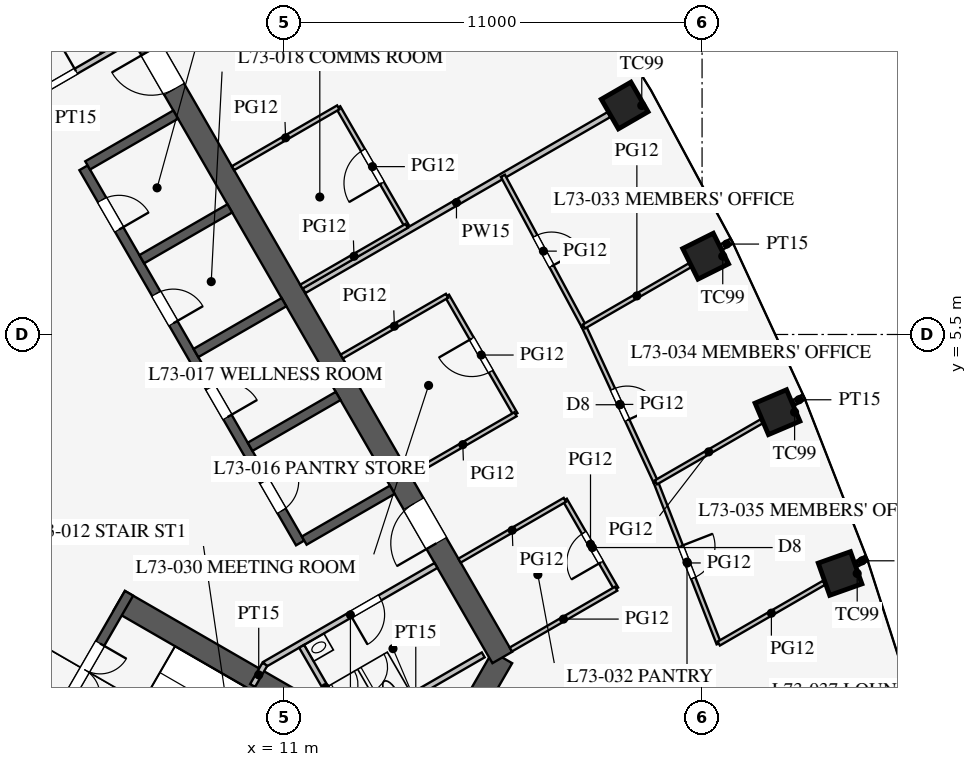
"""IFC4 building model, lengths in metres.
Left out: names, types, materials, properties, quantities, classifications, styles, units other than length and angle.
Written with IfcOpenShell. Run it as: python <this file> out.ifc"""

import sys

from ifc_helpers import new_model, si_unit, direction, frame, frame_2d, origin, origin_2d, place, context, subcontext, project, spatial, rectangle, extrude, element, fill, save


model = new_model("IFC4")
c1 = context("Model", 3, precision=1e-05, world=origin(), true_north=direction((0.0, 1.0)))
c2 = subcontext(c1, "Body", "Model", "MODEL_VIEW")
j1 = project(units=[si_unit("LENGTHUNIT", "METRE"), si_unit("PLANEANGLEUNIT", "RADIAN")], contexts=[c1])
p1 = place(None, origin())
s1 = spatial("IfcSite", under=j1, at=p1, CompositionType="ELEMENT")
p2 = place(p1, origin())
s2 = spatial("IfcBuilding", under=s1, at=p2, CompositionType="ELEMENT")
p3 = place(p2, frame((0.0, 0.0, 318.3)))
s3 = spatial("IfcBuildingStorey", under=s2, at=p3, CompositionType="ELEMENT", Elevation=318.3)
for number, where, z_axis, x_axis in (
    (1, (25.632, -0.79, 0.0), (0.0, 0.0, 1.0), (-0.334, 0.942, 0.0)),
    (2, (23.985, 3.455, 0.0), (0.0, 0.0, 1.0), (-0.391, 0.92, 0.0)),
    (3, (22.094, 7.56, 0.0), (0.0, 0.0, 1.0), (-0.447, 0.895, 0.0)),
    (4, (19.963, 11.526, 0.0), (0.0, 0.0, 1.0), (-0.5, 0.866, 0.0)),
):
    element("IfcColumn", number, at=place(p3, frame(where, z_axis=z_axis, x_axis=x_axis)), inside=s3, PredefinedType="COLUMN", context=c2, shape_type="SweptSolid", body=[
        extrude(rectangle(XDim=0.9, YDim=0.9, at=origin_2d()), origin(), (0.0, 0.0, 1.0), 4.2),
    ])
p4 = place(p3, frame((10.97, -13.0, 0.0), z_axis=(0.0, 0.0, 1.0), x_axis=(0.499995765644, 0.866027848477, 0.0)))
e5 = element("IfcWall", 5, at=p4, inside=s3, PredefinedType="SHEAR", context=c2, shape_type="SweptSolid", body=[
    extrude(rectangle(XDim=11.547, YDim=0.6, at=frame_2d((5.773, 0.0))), origin(), (0.0, 0.0, 1.0), 4.2),
])
p5 = place(p3, frame((16.743, -3.0, 0.0), z_axis=(0.0, 0.0, 1.0), x_axis=(-0.500002442456, 0.866023993627, 0.0)))
e6 = element("IfcWall", 6, at=p5, inside=s3, PredefinedType="SHEAR", context=c2, shape_type="SweptSolid", body=[
    extrude(rectangle(XDim=21.939, YDim=0.6, at=frame_2d((10.97, 0.0))), origin(), (0.0, 0.0, 1.0), 4.2),
])
p6 = place(p5, frame((17.27, 0.0, 0.0)))
e7 = element("IfcOpeningElement", 7, at=p6, cuts=e6, PredefinedType="OPENING", context=c2, shape_type="SweptSolid", body=[
    extrude(rectangle(XDim=1.2, YDim=2.1, at=frame_2d((0.6, 1.05))), frame((0.0, 0.31, 0.0), z_axis=(0.0, -1.0, 0.0), x_axis=(1.0, 0.0, 0.0)), (0.0, 0.0, 1.0), 0.62),
])
p7 = place(p5, frame((3.47, 0.0, 0.0)))
e8 = element("IfcOpeningElement", 8, at=p7, cuts=e6, PredefinedType="OPENING", context=c2, shape_type="SweptSolid", body=[
    extrude(rectangle(XDim=1.2, YDim=2.1, at=frame_2d((0.6, 1.05))), frame((0.0, 0.31, 0.0), z_axis=(0.0, -1.0, 0.0), x_axis=(1.0, 0.0, 0.0)), (0.0, 0.0, 1.0), 0.62),
])
p8 = place(p3, frame((11.424, 0.014, 0.0), z_axis=(0.0, 0.0, 1.0), x_axis=(-0.500001763848, 0.866024385424, 0.0)))
e9 = element("IfcWall", 9, at=p8, inside=s3, PredefinedType="SHEAR", context=c2, shape_type="SweptSolid", body=[
    extrude(rectangle(XDim=11.4, YDim=0.25, at=frame_2d((5.7, 0.0))), origin(), (0.0, 0.0, 1.0), 4.2),
])
p9 = place(p8, frame((0.975, 0.0, 0.0)))
e10 = element("IfcOpeningElement", 10, at=p9, cuts=e9, PredefinedType="OPENING", context=c2, shape_type="SweptSolid", body=[
    extrude(rectangle(XDim=0.9, YDim=2.1, at=frame_2d((0.45, 1.05))), frame((0.0, 0.135, 0.0), z_axis=(0.0, -1.0, 0.0), x_axis=(1.0, 0.0, 0.0)), (0.0, 0.0, 1.0), 0.27),
])
p10 = place(p8, frame((3.825, 0.0, 0.0)))
e11 = element("IfcOpeningElement", 11, at=p10, cuts=e9, PredefinedType="OPENING", context=c2, shape_type="SweptSolid", body=[
    extrude(rectangle(XDim=0.9, YDim=2.1, at=frame_2d((0.45, 1.05))), frame((0.0, 0.135, 0.0), z_axis=(0.0, -1.0, 0.0), x_axis=(1.0, 0.0, 0.0)), (0.0, 0.0, 1.0), 0.27),
])
p11 = place(p8, frame((6.675, 0.0, 0.0)))
e12 = element("IfcOpeningElement", 12, at=p11, cuts=e9, PredefinedType="OPENING", context=c2, shape_type="SweptSolid", body=[
    extrude(rectangle(XDim=0.9, YDim=2.1, at=frame_2d((0.45, 1.05))), frame((0.0, 0.135, 0.0), z_axis=(0.0, -1.0, 0.0), x_axis=(1.0, 0.0, 0.0)), (0.0, 0.0, 1.0), 0.27),
])
p12 = place(p8, frame((9.525, 0.0, 0.0)))
e13 = element("IfcOpeningElement", 13, at=p12, cuts=e9, PredefinedType="OPENING", context=c2, shape_type="SweptSolid", body=[
    extrude(rectangle(XDim=0.9, YDim=2.1, at=frame_2d((0.45, 1.05))), frame((0.0, 0.135, 0.0), z_axis=(0.0, -1.0, 0.0), x_axis=(1.0, 0.0, 0.0)), (0.0, 0.0, 1.0), 0.27),
])
for number, where, z_axis, x_axis in (
    (14, (11.532, 0.076, 0.0), (0.0, 0.0, 1.0), (0.866, 0.5, 0.0)),
    (15, (10.107, 2.544, 0.0), (0.0, 0.0, 1.0), (0.866, 0.5, 0.0)),
    (16, (8.682, 5.012, 0.0), (0.0, 0.0, 1.0), (0.866, 0.5, 0.0)),
    (17, (7.257, 7.481, 0.0), (0.0, 0.0, 1.0), (0.866, 0.5, 0.0)),
    (18, (5.832, 9.949, 0.0), (0.0, 0.0, 1.0), (0.866, 0.5, 0.0)),
):
    element("IfcWall", number, at=place(p3, frame(where, z_axis=z_axis, x_axis=x_axis)), inside=s3, PredefinedType="SHEAR", context=c2, shape_type="SweptSolid", body=[
        extrude(rectangle(XDim=2.675, YDim=0.25, at=frame_2d((1.337, 0.0))), origin(), (0.0, 0.0, 1.0), 4.2),
    ])
p13 = place(p3, frame((6.663, -1.509, 0.0), z_axis=(0.0, 0.0, 1.0), x_axis=(0.86603049496, -0.499991181721, 0.0)))
e19 = element("IfcWall", 19, at=p13, inside=s3, PredefinedType="SHEAR", context=c2, shape_type="SweptSolid", body=[
    extrude(rectangle(XDim=9.175, YDim=0.6, at=frame_2d((4.587, 0.0))), origin(), (0.0, 0.0, 1.0), 4.2),
])
p14 = place(p3, frame((4.597, -5.339, 0.0), z_axis=(0.0, 0.0, 1.0), x_axis=(0.499984536904, 0.866034331223, 0.0)))
e20 = element("IfcWall", 20, at=p14, inside=s3, PredefinedType="SHEAR", context=c2, shape_type="SweptSolid", body=[
    extrude(rectangle(XDim=4.65, YDim=0.25, at=frame_2d((2.325, 0.0))), origin(), (0.0, 0.0, 1.0), 4.2),
])
p15 = place(p14, frame((1.525, 0.0, 0.0)))
e21 = element("IfcOpeningElement", 21, at=p15, cuts=e20, PredefinedType="OPENING", context=c2, shape_type="SweptSolid", body=[
    extrude(rectangle(XDim=1.6, YDim=2.1, at=frame_2d((0.8, 1.05))), frame((0.0, 0.135, 0.0), z_axis=(0.0, -1.0, 0.0), x_axis=(1.0, 0.0, 0.0)), (0.0, 0.0, 1.0), 0.27),
])
p16 = place(p3, frame((2.495, 10.678, 0.0), z_axis=(0.0, 0.0, 1.0), x_axis=(0.866021400173, 0.500006934395, 0.0)))
e22 = element("IfcWall", 22, at=p16, inside=s3, PredefinedType="PARTITIONING", context=c2, shape_type="SweptSolid", body=[
    extrude(rectangle(XDim=5.2, YDim=0.15, at=frame_2d((2.6, 0.0))), origin(), (0.0, 0.0, 1.0), 4.0),
])
p17 = place(p16, frame((2.6, 0.0, 0.0)))
e23 = element("IfcOpeningElement", 23, at=p17, cuts=e22, PredefinedType="OPENING", context=c2, shape_type="SweptSolid", body=[
    extrude(rectangle(XDim=0.9, YDim=2.1, at=frame_2d((0.45, 1.05))), frame((0.0, 0.085, 0.0), z_axis=(0.0, -1.0, 0.0), x_axis=(1.0, 0.0, 0.0)), (0.0, 0.0, 1.0), 0.17),
])
p18 = place(p3, frame((10.495, -3.178, 0.0), z_axis=(0.0, 0.0, 1.0), x_axis=(0.866021400173, 0.500006934395, 0.0)))
e24 = element("IfcWall", 24, at=p18, inside=s3, PredefinedType="PARTITIONING", context=c2, shape_type="SweptSolid", body=[
    extrude(rectangle(XDim=5.2, YDim=0.15, at=frame_2d((2.6, 0.0))), origin(), (0.0, 0.0, 1.0), 4.0),
])
p19 = place(p18, frame((2.6, 0.0, 0.0)))
e25 = element("IfcOpeningElement", 25, at=p19, cuts=e24, PredefinedType="OPENING", context=c2, shape_type="SweptSolid", body=[
    extrude(rectangle(XDim=0.9, YDim=2.1, at=frame_2d((0.45, 1.05))), frame((0.0, 0.085, 0.0), z_axis=(0.0, -1.0, 0.0), x_axis=(1.0, 0.0, 0.0)), (0.0, 0.0, 1.0), 0.17),
])
p20 = place(p3, frame((10.495, -3.178, 0.0), z_axis=(0.0, 0.0, 1.0), x_axis=(-0.499842556608, -0.866116284689, 0.0)))
e26 = element("IfcWall", 26, at=p20, inside=s3, PredefinedType="PARTITIONING", context=c2, shape_type="SweptSolid", body=[
    extrude(rectangle(XDim=0.645, YDim=0.15, at=frame_2d((0.323, 0.0))), origin(), (0.0, 0.0, 1.0), 4.0),
])
p21 = place(p3, frame((12.691, -4.982, 0.0), z_axis=(0.0, 0.0, 1.0), x_axis=(0.8660249478, 0.500000789788, 0.0)))
e27 = element("IfcWall", 27, at=p21, inside=s3, PredefinedType="PARTITIONING", context=c2, shape_type="SweptSolid", body=[
    extrude(rectangle(XDim=4.1, YDim=0.15, at=frame_2d((2.05, 0.0))), origin(), (0.0, 0.0, 1.0), 4.0),
])
p22 = place(p3, frame((11.464, -2.706, 0.0), z_axis=(0.0, 0.0, 1.0), x_axis=(0.50001992892, -0.866013897511, 0.0)))
e28 = element("IfcWall", 28, at=p22, inside=s3, PredefinedType="PARTITIONING", context=c2, shape_type="SweptSolid", body=[
    extrude(rectangle(XDim=2.51, YDim=0.15, at=frame_2d((1.255, 0.0))), origin(), (0.0, 0.0, 1.0), 4.0),
])
p23 = place(p3, frame((11.527, 6.655, 0.0), z_axis=(0.0, 0.0, 1.0), x_axis=(0.866021846952, 0.500006160563, 0.0)))
e29 = element("IfcWall", 29, at=p23, inside=s3, PredefinedType="PARTITIONING", context=c2, shape_type="SweptSolid", body=[
    extrude(rectangle(XDim=9.262, YDim=0.15, at=frame_2d((4.631, 0.0))), origin(), (0.0, 0.0, 1.0), 3.3),
])
p24 = place(p3, frame((14.227, 8.358, 0.0), z_axis=(0.0, 0.0, 1.0), x_axis=(-0.499961193289, 0.866047807691, 0.0)))
e30 = element("IfcWall", 30, at=p24, inside=s3, PredefinedType="PARTITIONING", context=c2, shape_type="SweptSolid", body=[
    extrude(rectangle(XDim=3.6, YDim=0.12, at=frame_2d((1.8, 0.0))), origin(), (0.0, 0.0, 1.0), 2.9),
])
p25 = place(p24, frame((1.3, 0.0, 0.15)))
e31 = element("IfcOpeningElement", 31, at=p25, cuts=e30, PredefinedType="OPENING", context=c2, shape_type="SweptSolid", body=[
    extrude(rectangle(XDim=1.0, YDim=2.1, at=frame_2d((0.5, 1.05))), frame((0.0, 0.07, 0.0), z_axis=(0.0, -1.0, 0.0), x_axis=(1.0, 0.0, 0.0)), (0.0, 0.0, 1.0), 0.14),
])
p26 = place(p3, frame((19.74, -1.19, 0.0), z_axis=(0.0, 0.0, 1.0), x_axis=(-0.50000943426, 0.866019956843, 0.0)))
e32 = element("IfcWall", 32, at=p26, inside=s3, PredefinedType="PARTITIONING", context=c2, shape_type="SweptSolid", body=[
    extrude(rectangle(XDim=2.7, YDim=0.12, at=frame_2d((1.35, 0.0))), origin(), (0.0, 0.0, 1.0), 2.9),
])
p27 = place(p26, frame((0.8, 0.0, 0.15)))
e33 = element("IfcOpeningElement", 33, at=p27, cuts=e32, PredefinedType="OPENING", context=c2, shape_type="SweptSolid", body=[
    extrude(rectangle(XDim=0.9, YDim=2.1, at=frame_2d((0.45, 1.05))), frame((0.0, 0.07, 0.0), z_axis=(0.0, -1.0, 0.0), x_axis=(1.0, 0.0, 0.0)), (0.0, 0.0, 1.0), 0.14),
])
p28 = place(p3, frame((17.089, 3.4, 0.0), z_axis=(0.0, 0.0, 1.0), x_axis=(-0.499982693035, 0.866035395735, 0.0)))
e34 = element("IfcWall", 34, at=p28, inside=s3, PredefinedType="PARTITIONING", context=c2, shape_type="SweptSolid", body=[
    extrude(rectangle(XDim=3.6, YDim=0.12, at=frame_2d((1.8, 0.0))), origin(), (0.0, 0.0, 1.0), 2.9),
])
p29 = place(p28, frame((1.3, 0.0, 0.15)))
e35 = element("IfcOpeningElement", 35, at=p29, cuts=e34, PredefinedType="OPENING", context=c2, shape_type="SweptSolid", body=[
    extrude(rectangle(XDim=1.0, YDim=2.1, at=frame_2d((0.5, 1.05))), frame((0.0, 0.07, 0.0), z_axis=(0.0, -1.0, 0.0), x_axis=(1.0, 0.0, 0.0)), (0.0, 0.0, 1.0), 0.14),
])
p30 = place(p3, frame((11.456, 6.758, 0.0), z_axis=(0.0, 0.0, 1.0), x_axis=(0.866042017984, 0.499971222258, 0.0)))
e36 = element("IfcWall", 36, at=p30, inside=s3, PredefinedType="PARTITIONING", context=c2, shape_type="SweptSolid", body=[
    extrude(rectangle(XDim=3.2, YDim=0.12, at=frame_2d((1.6, 0.0))), origin(), (0.0, 0.0, 1.0), 2.9),
])
for number, where, z_axis, x_axis in (
    (37, (9.656, 9.876, 0.0), (0.0, 0.0, 1.0), (0.866, 0.5, 0.0)),
    (38, (16.968, -2.79, 0.0), (0.0, 0.0, 1.0), (0.866, 0.5, 0.0)),
):
    element("IfcWall", number, at=place(p3, frame(where, z_axis=z_axis, x_axis=x_axis)), inside=s3, PredefinedType="PARTITIONING", context=c2, shape_type="SweptSolid", body=[
        extrude(rectangle(XDim=3.2, YDim=0.12, at=frame_2d((1.6, 0.0))), origin(), (0.0, 0.0, 1.0), 2.9),
    ])
for number, where, z_axis, x_axis in (
    (39, (12.518, 4.918, 0.0), (0.0, 0.0, 1.0), (0.866, 0.5, 0.0)),
    (40, (14.318, 1.8, 0.0), (0.0, 0.0, 1.0), (0.866, 0.5, 0.0)),
    (41, (15.618, -0.451, 0.0), (0.0, 0.0, 1.0), (0.866, 0.5, 0.0)),
):
    element("IfcWall", number, at=place(p3, frame(where, z_axis=z_axis, x_axis=x_axis)), inside=s3, PredefinedType="PARTITIONING", context=c2, shape_type="SweptSolid", body=[
        extrude(rectangle(XDim=3.2, YDim=0.12, at=frame_2d((1.6, 0.0))), origin(), (0.0, 0.0, 1.0), 2.9),
    ])
p31 = place(p3, frame((26.089, -0.526, 0.0), z_axis=(0.0, 0.0, 1.0), x_axis=(0.865982457891, 0.500074377092, 0.0)))
e42 = element("IfcWall", 42, at=p31, inside=s3, PredefinedType="PARTITIONING", context=c2, shape_type="SweptSolid", body=[
    extrude(rectangle(XDim=0.28, YDim=0.15, at=frame_2d((0.14, 0.0))), origin(), (0.0, 0.0, 1.0), 2.9),
])
p32 = place(p3, frame((22.51, 7.8, 0.0), z_axis=(0.0, 0.0, 1.0), x_axis=(0.866095534226, 0.499878510834, 0.0)))
e43 = element("IfcWall", 43, at=p32, inside=s3, PredefinedType="PARTITIONING", context=c2, shape_type="SweptSolid", body=[
    extrude(rectangle(XDim=0.316, YDim=0.15, at=frame_2d((0.158, 0.0))), origin(), (0.0, 0.0, 1.0), 2.9),
])
p33 = place(p3, frame((24.422, 3.708, 0.0), z_axis=(0.0, 0.0, 1.0), x_axis=(0.866254317358, 0.499603300288, 0.0)))
e44 = element("IfcWall", 44, at=p33, inside=s3, PredefinedType="PARTITIONING", context=c2, shape_type="SweptSolid", body=[
    extrude(rectangle(XDim=0.296, YDim=0.15, at=frame_2d((0.148, 0.0))), origin(), (0.0, 0.0, 1.0), 2.9),
])
p34 = place(p3, frame((22.439, -2.633, 0.0), z_axis=(0.0, 0.0, 1.0), x_axis=(-0.363212149153, 0.931706463811, 0.0)))
e45 = element("IfcWall", 45, at=p34, inside=s3, PredefinedType="PARTITIONING", context=c2, shape_type="SweptSolid", body=[
    extrude(rectangle(XDim=4.553, YDim=0.12, at=frame_2d((2.276, 0.0))), origin(), (0.0, 0.0, 1.0), 2.9),
])
p35 = place(p34, frame((1.85, 0.0, 0.15)))
e46 = element("IfcOpeningElement", 46, at=p35, cuts=e45, PredefinedType="OPENING", context=c2, shape_type="SweptSolid", body=[
    extrude(rectangle(XDim=0.9, YDim=2.1, at=frame_2d((0.45, 1.05))), frame((0.0, 0.07, 0.0), z_axis=(0.0, -1.0, 0.0), x_axis=(1.0, 0.0, 0.0)), (0.0, 0.0, 1.0), 0.14),
])
p36 = place(p3, frame((18.891, 5.71, 0.0), z_axis=(0.0, 0.0, 1.0), x_axis=(-0.473524102582, 0.880780860529, 0.0)))
e47 = element("IfcWall", 47, at=p36, inside=s3, PredefinedType="PARTITIONING", context=c2, shape_type="SweptSolid", body=[
    extrude(rectangle(XDim=4.502, YDim=0.12, at=frame_2d((2.251, 0.0))), origin(), (0.0, 0.0, 1.0), 2.9),
])
p37 = place(p36, frame((1.8, 0.0, 0.15)))
e48 = element("IfcOpeningElement", 48, at=p37, cuts=e47, PredefinedType="OPENING", context=c2, shape_type="SweptSolid", body=[
    extrude(rectangle(XDim=0.9, YDim=2.1, at=frame_2d((0.45, 1.05))), frame((0.0, 0.07, 0.0), z_axis=(0.0, -1.0, 0.0), x_axis=(1.0, 0.0, 0.0)), (0.0, 0.0, 1.0), 0.14),
])
p38 = place(p3, frame((20.786, 1.608, 0.0), z_axis=(0.0, 0.0, 1.0), x_axis=(-0.419335693458, 0.907831248742, 0.0)))
e49 = element("IfcWall", 49, at=p38, inside=s3, PredefinedType="PARTITIONING", context=c2, shape_type="SweptSolid", body=[
    extrude(rectangle(XDim=4.519, YDim=0.12, at=frame_2d((2.259, 0.0))), origin(), (0.0, 0.0, 1.0), 2.9),
])
p39 = place(p38, frame((1.8, 0.0, 0.15)))
e50 = element("IfcOpeningElement", 50, at=p39, cuts=e49, PredefinedType="OPENING", context=c2, shape_type="SweptSolid", body=[
    extrude(rectangle(XDim=0.9, YDim=2.1, at=frame_2d((0.45, 1.05))), frame((0.0, 0.07, 0.0), z_axis=(0.0, -1.0, 0.0), x_axis=(1.0, 0.0, 0.0)), (0.0, 0.0, 1.0), 0.14),
])
p40 = place(p3, frame((22.439, -2.633, 0.0), z_axis=(0.0, 0.0, 1.0), x_axis=(0.866012717091, 0.500021973353, 0.0)))
e51 = element("IfcWall", 51, at=p40, inside=s3, PredefinedType="PARTITIONING", context=c2, shape_type="SweptSolid", body=[
    extrude(rectangle(XDim=3.198, YDim=0.12, at=frame_2d((1.599, 0.0))), origin(), (0.0, 0.0, 1.0), 2.9),
])
p41 = place(p3, frame((18.891, 5.71, 0.0), z_axis=(0.0, 0.0, 1.0), x_axis=(0.866021328928, 0.500007057792, 0.0)))
e52 = element("IfcWall", 52, at=p41, inside=s3, PredefinedType="PARTITIONING", context=c2, shape_type="SweptSolid", body=[
    extrude(rectangle(XDim=3.218, YDim=0.12, at=frame_2d((1.609, 0.0))), origin(), (0.0, 0.0, 1.0), 2.9),
])
p42 = place(p3, frame((20.786, 1.608, 0.0), z_axis=(0.0, 0.0, 1.0), x_axis=(0.866039964284, 0.499974779627, 0.0)))
e53 = element("IfcWall", 53, at=p42, inside=s3, PredefinedType="PARTITIONING", context=c2, shape_type="SweptSolid", body=[
    extrude(rectangle(XDim=3.211, YDim=0.12, at=frame_2d((1.605, 0.0))), origin(), (0.0, 0.0, 1.0), 2.9),
])
p43 = place(p17, origin())
e54 = element("IfcDoor", 54, at=p43, inside=s3, OperationType="SINGLE_SWING_RIGHT", PredefinedType="DOOR", context=c2, shape_type="SweptSolid", body=[
    extrude(rectangle(XDim=0.9, YDim=2.1, at=frame_2d((0.45, 1.05))), frame((0.0, 0.025, 0.0), z_axis=(0.0, -1.0, 0.0), x_axis=(1.0, 0.0, 0.0)), (0.0, 0.0, 1.0), 0.05),
])
fill(e23, e54)
p44 = place(p19, frame((0.9, 0.0, 0.0), z_axis=(0.0, 0.0, 1.0), x_axis=(-1.0, 0.0, 0.0)))
e55 = element("IfcDoor", 55, at=p44, inside=s3, OperationType="SINGLE_SWING_RIGHT", PredefinedType="DOOR", context=c2, shape_type="SweptSolid", body=[
    extrude(rectangle(XDim=0.9, YDim=2.1, at=frame_2d((0.45, 1.05))), frame((0.0, 0.025, 0.0), z_axis=(0.0, -1.0, 0.0), x_axis=(1.0, 0.0, 0.0)), (0.0, 0.0, 1.0), 0.05),
])
fill(e25, e55)
p45 = place(p15, frame((1.6, 0.0, 0.0), z_axis=(0.0, 0.0, 1.0), x_axis=(-1.0, 0.0, 0.0)))
e56 = element("IfcDoor", 56, at=p45, inside=s3, OperationType="DOUBLE_DOOR_SINGLE_SWING", PredefinedType="DOOR", context=c2, shape_type="SweptSolid", body=[
    extrude(rectangle(XDim=1.6, YDim=2.1, at=frame_2d((0.8, 1.05))), frame((0.0, 0.025, 0.0), z_axis=(0.0, -1.0, 0.0), x_axis=(1.0, 0.0, 0.0)), (0.0, 0.0, 1.0), 0.05),
])
fill(e21, e56)
p46 = place(p6, origin())
e57 = element("IfcDoor", 57, at=p46, inside=s3, OperationType="SINGLE_SWING_RIGHT", PredefinedType="DOOR", context=c2, shape_type="SweptSolid", body=[
    extrude(rectangle(XDim=1.2, YDim=2.1, at=frame_2d((0.6, 1.05))), frame((0.0, 0.025, 0.0), z_axis=(0.0, -1.0, 0.0), x_axis=(1.0, 0.0, 0.0)), (0.0, 0.0, 1.0), 0.05),
])
fill(e7, e57)
p47 = place(p7, origin())
e58 = element("IfcDoor", 58, at=p47, inside=s3, OperationType="SINGLE_SWING_LEFT", PredefinedType="DOOR", context=c2, shape_type="SweptSolid", body=[
    extrude(rectangle(XDim=1.2, YDim=2.1, at=frame_2d((0.6, 1.05))), frame((0.0, 0.025, 0.0), z_axis=(0.0, -1.0, 0.0), x_axis=(1.0, 0.0, 0.0)), (0.0, 0.0, 1.0), 0.05),
])
fill(e8, e58)
p48 = place(p9, frame((0.9, 0.0, 0.0), z_axis=(0.0, 0.0, 1.0), x_axis=(-1.0, 0.0, 0.0)))
e59 = element("IfcDoor", 59, at=p48, inside=s3, OperationType="SINGLE_SWING_LEFT", PredefinedType="DOOR", context=c2, shape_type="SweptSolid", body=[
    extrude(rectangle(XDim=0.9, YDim=2.1, at=frame_2d((0.45, 1.05))), frame((0.0, 0.025, 0.0), z_axis=(0.0, -1.0, 0.0), x_axis=(1.0, 0.0, 0.0)), (0.0, 0.0, 1.0), 0.05),
])
fill(e10, e59)
p49 = place(p10, frame((0.9, 0.0, 0.0), z_axis=(0.0, 0.0, 1.0), x_axis=(-1.0, 0.0, 0.0)))
e60 = element("IfcDoor", 60, at=p49, inside=s3, OperationType="SINGLE_SWING_RIGHT", PredefinedType="DOOR", context=c2, shape_type="SweptSolid", body=[
    extrude(rectangle(XDim=0.9, YDim=2.1, at=frame_2d((0.45, 1.05))), frame((0.0, 0.025, 0.0), z_axis=(0.0, -1.0, 0.0), x_axis=(1.0, 0.0, 0.0)), (0.0, 0.0, 1.0), 0.05),
])
fill(e11, e60)
p50 = place(p11, frame((0.9, 0.0, 0.0), z_axis=(0.0, 0.0, 1.0), x_axis=(-1.0, 0.0, 0.0)))
e61 = element("IfcDoor", 61, at=p50, inside=s3, OperationType="SINGLE_SWING_RIGHT", PredefinedType="DOOR", context=c2, shape_type="SweptSolid", body=[
    extrude(rectangle(XDim=0.9, YDim=2.1, at=frame_2d((0.45, 1.05))), frame((0.0, 0.025, 0.0), z_axis=(0.0, -1.0, 0.0), x_axis=(1.0, 0.0, 0.0)), (0.0, 0.0, 1.0), 0.05),
])
fill(e12, e61)
p51 = place(p12, frame((0.9, 0.0, 0.0), z_axis=(0.0, 0.0, 1.0), x_axis=(-1.0, 0.0, 0.0)))
e62 = element("IfcDoor", 62, at=p51, inside=s3, OperationType="SINGLE_SWING_RIGHT", PredefinedType="DOOR", context=c2, shape_type="SweptSolid", body=[
    extrude(rectangle(XDim=0.9, YDim=2.1, at=frame_2d((0.45, 1.05))), frame((0.0, 0.025, 0.0), z_axis=(0.0, -1.0, 0.0), x_axis=(1.0, 0.0, 0.0)), (0.0, 0.0, 1.0), 0.05),
])
fill(e13, e62)
p52 = place(p29, origin())
e63 = element("IfcDoor", 63, at=p52, inside=s3, OperationType="SINGLE_SWING_RIGHT", PredefinedType="DOOR", context=c2, shape_type="SweptSolid", body=[
    extrude(rectangle(XDim=1.0, YDim=2.1, at=frame_2d((0.5, 1.05))), frame((0.0, 0.025, 0.0), z_axis=(0.0, -1.0, 0.0), x_axis=(1.0, 0.0, 0.0)), (0.0, 0.0, 1.0), 0.05),
])
fill(e35, e63)
p53 = place(p25, origin())
e64 = element("IfcDoor", 64, at=p53, inside=s3, OperationType="SINGLE_SWING_LEFT", PredefinedType="DOOR", context=c2, shape_type="SweptSolid", body=[
    extrude(rectangle(XDim=1.0, YDim=2.1, at=frame_2d((0.5, 1.05))), frame((0.0, 0.025, 0.0), z_axis=(0.0, -1.0, 0.0), x_axis=(1.0, 0.0, 0.0)), (0.0, 0.0, 1.0), 0.05),
])
fill(e31, e64)
p54 = place(p27, origin())
e65 = element("IfcDoor", 65, at=p54, inside=s3, OperationType="SINGLE_SWING_LEFT", PredefinedType="DOOR", context=c2, shape_type="SweptSolid", body=[
    extrude(rectangle(XDim=0.9, YDim=2.1, at=frame_2d((0.45, 1.05))), frame((0.0, 0.025, 0.0), z_axis=(0.0, -1.0, 0.0), x_axis=(1.0, 0.0, 0.0)), (0.0, 0.0, 1.0), 0.05),
])
fill(e33, e65)
p55 = place(p37, frame((0.9, 0.0, 0.0), z_axis=(0.0, 0.0, 1.0), x_axis=(-1.0, 0.0, 0.0)))
e66 = element("IfcDoor", 66, at=p55, inside=s3, OperationType="SINGLE_SWING_RIGHT", PredefinedType="DOOR", context=c2, shape_type="SweptSolid", body=[
    extrude(rectangle(XDim=0.9, YDim=2.1, at=frame_2d((0.45, 1.05))), frame((0.0, 0.025, 0.0), z_axis=(0.0, -1.0, 0.0), x_axis=(1.0, 0.0, 0.0)), (0.0, 0.0, 1.0), 0.05),
])
fill(e48, e66)
p56 = place(p39, frame((0.9, 0.0, 0.0), z_axis=(0.0, 0.0, 1.0), x_axis=(-1.0, 0.0, 0.0)))
e67 = element("IfcDoor", 67, at=p56, inside=s3, OperationType="SINGLE_SWING_RIGHT", PredefinedType="DOOR", context=c2, shape_type="SweptSolid", body=[
    extrude(rectangle(XDim=0.9, YDim=2.1, at=frame_2d((0.45, 1.05))), frame((0.0, 0.025, 0.0), z_axis=(0.0, -1.0, 0.0), x_axis=(1.0, 0.0, 0.0)), (0.0, 0.0, 1.0), 0.05),
])
fill(e50, e67)
p57 = place(p35, frame((0.9, 0.0, 0.0), z_axis=(0.0, 0.0, 1.0), x_axis=(-1.0, 0.0, 0.0)))
e68 = element("IfcDoor", 68, at=p57, inside=s3, OperationType="SINGLE_SWING_LEFT", PredefinedType="DOOR", context=c2, shape_type="SweptSolid", body=[
    extrude(rectangle(XDim=0.9, YDim=2.1, at=frame_2d((0.45, 1.05))), frame((0.0, 0.025, 0.0), z_axis=(0.0, -1.0, 0.0), x_axis=(1.0, 0.0, 0.0)), (0.0, 0.0, 1.0), 0.05),
])
fill(e46, e68)
save(model, sys.argv[1])
